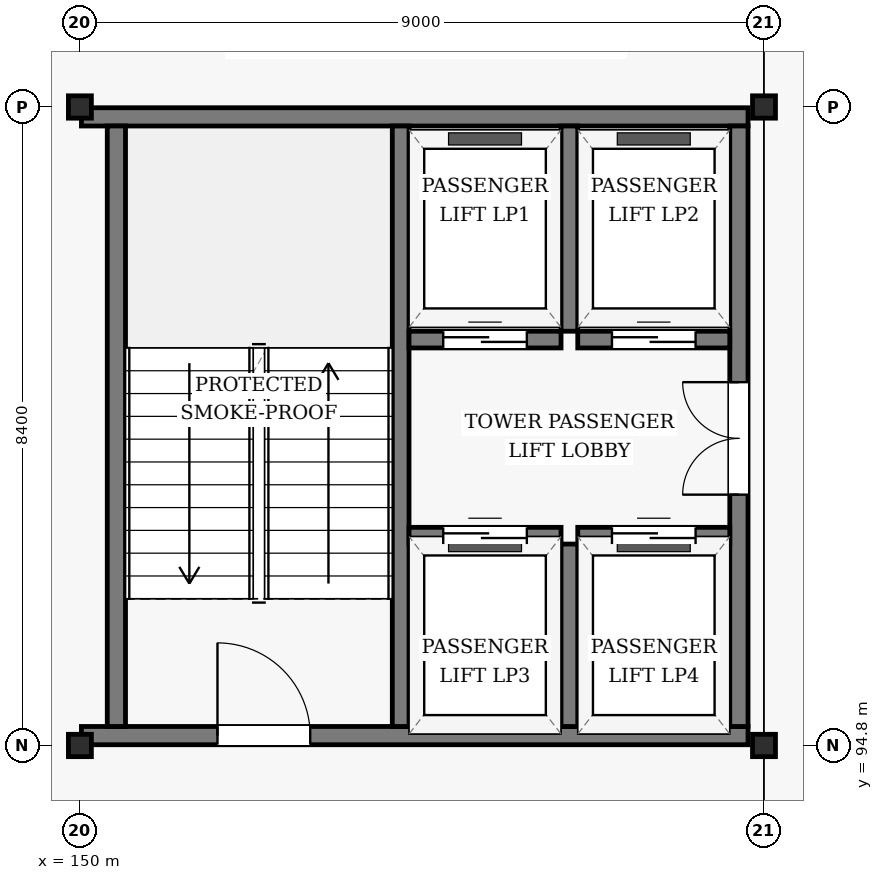
"""IFC4 building model, lengths in metres.
Left out: names, types, materials, properties, quantities, classifications, styles, units other than length and angle.
Written with IfcOpenShell. Run it as: python <this file> out.ifc"""

import sys

from ifc_helpers import new_model, si_unit, direction, frame, frame_2d, origin, origin_2d, place, context, subcontext, project, spatial, rectangle, i_section, extrude, element, fill, save


model = new_model("IFC4")
c1 = context("Model", 3, precision=1e-05, world=origin(), true_north=direction((0.0, 1.0)))
c2 = subcontext(c1, "Body", "Model", "MODEL_VIEW")
j1 = project(units=[si_unit("LENGTHUNIT", "METRE"), si_unit("PLANEANGLEUNIT", "RADIAN")], contexts=[c1])
p1 = place(None, origin())
s1 = spatial("IfcSite", under=j1, at=p1, CompositionType="ELEMENT")
p2 = place(p1, origin())
s2 = spatial("IfcBuilding", under=s1, at=p2, CompositionType="ELEMENT")
p3 = place(p2, frame((0.0, 0.0, 54.0)))
s3 = spatial("IfcBuildingStorey", under=s2, at=p3, CompositionType="ELEMENT", Elevation=54.0)
for number, where, z_axis, x_axis in (
    (1, (150.0, 94.8, 0.0), (0.0, 0.0, 1.0), (1.0, 0.0, 0.0)),
    (2, (150.0, 103.2, 0.0), (0.0, 0.0, 1.0), (1.0, 0.0, 0.0)),
    (3, (159.0, 94.8, 0.0), (0.0, 0.0, 1.0), (1.0, 0.0, 0.0)),
    (4, (159.0, 103.2, 0.0), (0.0, 0.0, 1.0), (1.0, 0.0, 0.0)),
):
    element("IfcColumn", number, at=place(p3, frame(where, z_axis=z_axis, x_axis=x_axis)), inside=s3, PredefinedType="COLUMN", context=c2, shape_type="SweptSolid", body=[
        extrude(i_section(OverallWidth=0.302, OverallDepth=0.294, WebThickness=0.012, FlangeThickness=0.012, FilletRadius=0.018, at=origin_2d()), origin(), (0.0, 0.0, 1.0), 3.6),
    ])
p4 = place(p3, frame((150.02, 94.93, 0.0), z_axis=(0.0, 0.0, 1.0), x_axis=(1.0, 0.0, 0.0)))
e5 = element("IfcWall", 5, at=p4, inside=s3, PredefinedType="SHEAR", context=c2, shape_type="SweptSolid", body=[
    extrude(rectangle(XDim=8.77, YDim=0.24, at=frame_2d((4.385, 0.0))), origin(), (0.0, 0.0, 1.0), 3.344),
])
p5 = place(p4, frame((1.79, 0.0, 0.0)))
e6 = element("IfcOpeningElement", 6, at=p5, cuts=e5, PredefinedType="OPENING", context=c2, shape_type="SweptSolid", body=[
    extrude(rectangle(XDim=1.22, YDim=2.18, at=frame_2d((0.61, 1.09))), frame((0.0, 0.13, 0.0), z_axis=(0.0, -1.0, 0.0), x_axis=(1.0, 0.0, 0.0)), (0.0, 0.0, 1.0), 0.26),
])
p6 = place(p3, frame((150.02, 103.07, 0.0), z_axis=(0.0, 0.0, 1.0), x_axis=(1.0, 0.0, 0.0)))
e7 = element("IfcWall", 7, at=p6, inside=s3, PredefinedType="SHEAR", context=c2, shape_type="SweptSolid", body=[
    extrude(rectangle(XDim=8.77, YDim=0.24, at=frame_2d((4.385, 0.0))), origin(), (0.0, 0.0, 1.0), 3.344),
])
p7 = place(p3, frame((150.48, 95.05, 0.0), z_axis=(0.0, 0.0, 1.0), x_axis=(0.0, 1.0, 0.0)))
e8 = element("IfcWall", 8, at=p7, inside=s3, PredefinedType="SHEAR", context=c2, shape_type="SweptSolid", body=[
    extrude(rectangle(XDim=7.9, YDim=0.24, at=frame_2d((3.95, 0.0))), origin(), (0.0, 0.0, 1.0), 3.344),
])
p8 = place(p3, frame((154.22, 95.05, 0.0), z_axis=(0.0, 0.0, 1.0), x_axis=(0.0, 1.0, 0.0)))
e9 = element("IfcWall", 9, at=p8, inside=s3, PredefinedType="SHEAR", context=c2, shape_type="SweptSolid", body=[
    extrude(rectangle(XDim=7.9, YDim=0.22, at=frame_2d((3.95, 0.0))), origin(), (0.0, 0.0, 1.0), 3.344),
])
p9 = place(p3, frame((158.67, 95.05, 0.0), z_axis=(0.0, 0.0, 1.0), x_axis=(0.0, 1.0, 0.0)))
e10 = element("IfcWall", 10, at=p9, inside=s3, PredefinedType="SHEAR", context=c2, shape_type="SweptSolid", body=[
    extrude(rectangle(XDim=7.9, YDim=0.24, at=frame_2d((3.95, 0.0))), origin(), (0.0, 0.0, 1.0), 3.344),
])
p10 = place(p9, frame((3.05, 0.0, 0.0)))
e11 = element("IfcOpeningElement", 11, at=p10, cuts=e10, PredefinedType="OPENING", context=c2, shape_type="SweptSolid", body=[
    extrude(rectangle(XDim=1.48, YDim=2.22, at=frame_2d((0.74, 1.11))), frame((0.0, 0.13, 0.0), z_axis=(0.0, -1.0, 0.0), x_axis=(1.0, 0.0, 0.0)), (0.0, 0.0, 1.0), 0.26),
])
p11 = place(p3, frame((156.44, 100.25, 0.0), z_axis=(0.0, 0.0, 1.0), x_axis=(0.0, 1.0, 0.0)))
e12 = element("IfcWall", 12, at=p11, inside=s3, PredefinedType="SHEAR", context=c2, shape_type="SweptSolid", body=[
    extrude(rectangle(XDim=2.7, YDim=0.22, at=frame_2d((1.35, 0.0))), origin(), (0.0, 0.0, 1.0), 3.344),
])
p12 = place(p3, frame((154.33, 100.14, 0.0), z_axis=(0.0, 0.0, 1.0), x_axis=(1.0, 0.0, 0.0)))
e13 = element("IfcWall", 13, at=p12, inside=s3, PredefinedType="SHEAR", context=c2, shape_type="SweptSolid", body=[
    extrude(rectangle(XDim=2.0, YDim=0.22, at=frame_2d((1.0, 0.0))), origin(), (0.0, 0.0, 1.0), 3.344),
])
p13 = place(p12, frame((0.45, 0.0, 0.0)))
e14 = element("IfcOpeningElement", 14, at=p13, cuts=e13, PredefinedType="OPENING", context=c2, shape_type="SweptSolid", body=[
    extrude(rectangle(XDim=1.1, YDim=2.15, at=frame_2d((0.55, 1.075))), frame((0.0, 0.12, 0.0), z_axis=(0.0, -1.0, 0.0), x_axis=(1.0, 0.0, 0.0)), (0.0, 0.0, 1.0), 0.24),
])
p14 = place(p3, frame((156.55, 100.14, 0.0), z_axis=(0.0, 0.0, 1.0), x_axis=(1.0, 0.0, 0.0)))
e15 = element("IfcWall", 15, at=p14, inside=s3, PredefinedType="SHEAR", context=c2, shape_type="SweptSolid", body=[
    extrude(rectangle(XDim=2.0, YDim=0.22, at=frame_2d((1.0, 0.0))), origin(), (0.0, 0.0, 1.0), 3.344),
])
p15 = place(p14, frame((0.45, 0.0, 0.0)))
e16 = element("IfcOpeningElement", 16, at=p15, cuts=e15, PredefinedType="OPENING", context=c2, shape_type="SweptSolid", body=[
    extrude(rectangle(XDim=1.1, YDim=2.15, at=frame_2d((0.55, 1.075))), frame((0.0, 0.12, 0.0), z_axis=(0.0, -1.0, 0.0), x_axis=(1.0, 0.0, 0.0)), (0.0, 0.0, 1.0), 0.24),
])
p16 = place(p3, frame((156.44, 95.05, 0.0), z_axis=(0.0, 0.0, 1.0), x_axis=(0.0, 1.0, 0.0)))
e17 = element("IfcWall", 17, at=p16, inside=s3, PredefinedType="SHEAR", context=c2, shape_type="SweptSolid", body=[
    extrude(rectangle(XDim=2.4, YDim=0.22, at=frame_2d((1.2, 0.0))), origin(), (0.0, 0.0, 1.0), 3.344),
])
p17 = place(p3, frame((154.33, 97.56, 0.0), z_axis=(0.0, 0.0, 1.0), x_axis=(1.0, 0.0, 0.0)))
e18 = element("IfcWall", 18, at=p17, inside=s3, PredefinedType="SHEAR", context=c2, shape_type="SweptSolid", body=[
    extrude(rectangle(XDim=2.0, YDim=0.22, at=frame_2d((1.0, 0.0))), origin(), (0.0, 0.0, 1.0), 3.344),
])
p18 = place(p17, frame((0.45, 0.0, 0.0)))
e19 = element("IfcOpeningElement", 19, at=p18, cuts=e18, PredefinedType="OPENING", context=c2, shape_type="SweptSolid", body=[
    extrude(rectangle(XDim=1.1, YDim=2.15, at=frame_2d((0.55, 1.075))), frame((0.0, 0.12, 0.0), z_axis=(0.0, -1.0, 0.0), x_axis=(1.0, 0.0, 0.0)), (0.0, 0.0, 1.0), 0.24),
])
p19 = place(p3, frame((156.55, 97.56, 0.0), z_axis=(0.0, 0.0, 1.0), x_axis=(1.0, 0.0, 0.0)))
e20 = element("IfcWall", 20, at=p19, inside=s3, PredefinedType="SHEAR", context=c2, shape_type="SweptSolid", body=[
    extrude(rectangle(XDim=2.0, YDim=0.22, at=frame_2d((1.0, 0.0))), origin(), (0.0, 0.0, 1.0), 3.344),
])
p20 = place(p19, frame((0.45, 0.0, 0.0)))
e21 = element("IfcOpeningElement", 21, at=p20, cuts=e20, PredefinedType="OPENING", context=c2, shape_type="SweptSolid", body=[
    extrude(rectangle(XDim=1.1, YDim=2.15, at=frame_2d((0.55, 1.075))), frame((0.0, 0.12, 0.0), z_axis=(0.0, -1.0, 0.0), x_axis=(1.0, 0.0, 0.0)), (0.0, 0.0, 1.0), 0.24),
])
p21 = place(p5, origin())
e22 = element("IfcDoor", 22, at=p21, inside=s3, OperationType="SINGLE_SWING_LEFT", PredefinedType="DOOR", context=c2, shape_type="SweptSolid", body=[
    extrude(rectangle(XDim=1.22, YDim=2.18, at=frame_2d((0.61, 1.09))), frame((0.0, 0.025, 0.0), z_axis=(0.0, -1.0, 0.0), x_axis=(1.0, 0.0, 0.0)), (0.0, 0.0, 1.0), 0.05),
])
fill(e6, e22)
p22 = place(p10, origin())
e23 = element("IfcDoor", 23, at=p22, inside=s3, OperationType="DOUBLE_DOOR_SINGLE_SWING", PredefinedType="DOOR", context=c2, shape_type="SweptSolid", body=[
    extrude(rectangle(XDim=1.48, YDim=2.22, at=frame_2d((0.74, 1.11))), frame((0.0, 0.025, 0.0), z_axis=(0.0, -1.0, 0.0), x_axis=(1.0, 0.0, 0.0)), (0.0, 0.0, 1.0), 0.05),
])
fill(e11, e23)
p23 = place(p13, origin())
e24 = element("IfcDoor", 24, at=p23, inside=s3, OperationType="SLIDING_TO_LEFT", PredefinedType="DOOR", context=c2, shape_type="SweptSolid", body=[
    extrude(rectangle(XDim=1.1, YDim=2.15, at=frame_2d((0.55, 1.075))), frame((0.0, 0.025, 0.0), z_axis=(0.0, -1.0, 0.0), x_axis=(1.0, 0.0, 0.0)), (0.0, 0.0, 1.0), 0.05),
])
fill(e14, e24)
p24 = place(p15, origin())
e25 = element("IfcDoor", 25, at=p24, inside=s3, OperationType="SLIDING_TO_LEFT", PredefinedType="DOOR", context=c2, shape_type="SweptSolid", body=[
    extrude(rectangle(XDim=1.1, YDim=2.15, at=frame_2d((0.55, 1.075))), frame((0.0, 0.025, 0.0), z_axis=(0.0, -1.0, 0.0), x_axis=(1.0, 0.0, 0.0)), (0.0, 0.0, 1.0), 0.05),
])
fill(e16, e25)
p25 = place(p18, origin())
e26 = element("IfcDoor", 26, at=p25, inside=s3, OperationType="SLIDING_TO_LEFT", PredefinedType="DOOR", context=c2, shape_type="SweptSolid", body=[
    extrude(rectangle(XDim=1.1, YDim=2.15, at=frame_2d((0.55, 1.075))), frame((0.0, 0.025, 0.0), z_axis=(0.0, -1.0, 0.0), x_axis=(1.0, 0.0, 0.0)), (0.0, 0.0, 1.0), 0.05),
])
fill(e19, e26)
p26 = place(p20, origin())
e27 = element("IfcDoor", 27, at=p26, inside=s3, OperationType="SLIDING_TO_LEFT", PredefinedType="DOOR", context=c2, shape_type="SweptSolid", body=[
    extrude(rectangle(XDim=1.1, YDim=2.15, at=frame_2d((0.55, 1.075))), frame((0.0, 0.025, 0.0), z_axis=(0.0, -1.0, 0.0), x_axis=(1.0, 0.0, 0.0)), (0.0, 0.0, 1.0), 0.05),
])
fill(e21, e27)
save(model, sys.argv[1])
